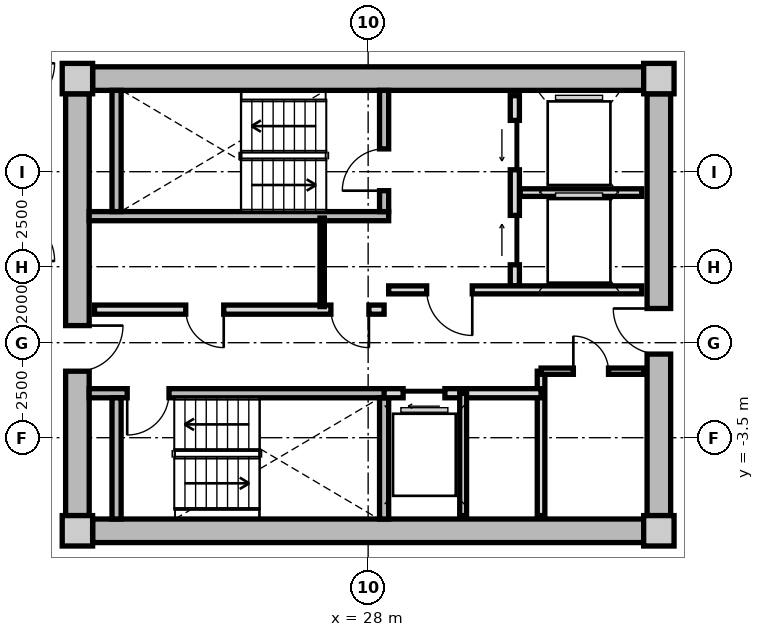
"""IFC4 building model, lengths in metres.
Left out: names, types, materials, properties, quantities, classifications, styles, units other than length and angle.
Written with IfcOpenShell. Run it as: python <this file> out.ifc"""

import sys

from ifc_helpers import new_model, si_unit, direction, frame, frame_2d, origin, origin_2d, place, context, subcontext, project, spatial, rectangle, extrude, source, transform, mapped, element, fill, save


model = new_model("IFC4")
c1 = context("Model", 3, precision=1e-05, world=origin(), true_north=direction((0.0, 1.0)))
c2 = subcontext(c1, "Body", "Model", "MODEL_VIEW")
j1 = project(units=[si_unit("LENGTHUNIT", "METRE"), si_unit("PLANEANGLEUNIT", "RADIAN")], contexts=[c1])
p1 = place(None, origin())
s1 = spatial("IfcSite", under=j1, at=p1, CompositionType="ELEMENT")
p2 = place(p1, origin())
s2 = spatial("IfcBuilding", under=s1, at=p2, CompositionType="ELEMENT")
p3 = place(p2, frame((0.0, 0.0, 140.4)))
s3 = spatial("IfcBuildingStorey", under=s2, at=p3, CompositionType="ELEMENT", Elevation=140.4)
m1 = source(origin(), c2, "Body", "SweptSolid", [
    extrude(rectangle(XDim=0.8, YDim=0.8, at=origin_2d()), origin(), (0.0, 0.0, 1.0), 3.05),
])
for number, where, z_axis, x_axis in (
    (1, (20.35, -5.95, 0.0), (0.0, 0.0, 1.0), (1.0, 0.0, 0.0)),
    (2, (35.65, -5.95, 0.0), (0.0, 0.0, 1.0), (1.0, 0.0, 0.0)),
    (3, (35.65, 5.95, 0.0), (0.0, 0.0, 1.0), (1.0, 0.0, 0.0)),
    (4, (20.35, 5.95, 0.0), (0.0, 0.0, 1.0), (1.0, 0.0, 0.0)),
):
    element("IfcColumn", number, at=place(p3, frame(where, z_axis=z_axis, x_axis=x_axis)), inside=s3, PredefinedType="COLUMN", context=c2, shape_type="MappedRepresentation", body=[
        mapped(m1, transform((0.0, 0.0, 0.0), x_axis=(1.0, 0.0, 0.0), y_axis=(0.0, 1.0, 0.0), z_axis=(0.0, 0.0, 1.0), scale=1.0)),
    ])
m2 = source(origin(), c2, "Body", "SweptSolid", [
    extrude(rectangle(XDim=14.5, YDim=0.62, at=frame_2d((7.25, 0.0))), origin(), (0.0, 0.0, 1.0), 2.81),
])
for number, where, z_axis, x_axis in (
    (5, (20.75, 5.95, 0.0), (0.0, 0.0, 1.0), (1.0, 0.0, 0.0)),
    (6, (35.25, -5.95, 0.0), (0.0, 0.0, 1.0), (-1.0, 0.0, 0.0)),
):
    element("IfcWall", number, at=place(p3, frame(where, z_axis=z_axis, x_axis=x_axis)), inside=s3, PredefinedType="SHEAR", context=c2, shape_type="MappedRepresentation", body=[
        mapped(m2, transform((0.0, 0.0, 0.0), x_axis=(1.0, 0.0, 0.0), y_axis=(0.0, 1.0, 0.0), z_axis=(0.0, 0.0, 1.0), scale=1.0)),
    ])
m3 = source(origin(), c2, "Body", "SweptSolid", [
    extrude(rectangle(XDim=11.1, YDim=0.62, at=frame_2d((5.55, 0.0))), origin(), (0.0, 0.0, 1.0), 2.81),
])
p4 = place(p3, frame((20.35, -5.55, 0.0), z_axis=(0.0, 0.0, 1.0), x_axis=(0.0, 1.0, 0.0)))
e7 = element("IfcWall", 7, at=p4, inside=s3, PredefinedType="SHEAR", context=c2, shape_type="MappedRepresentation", body=[
    mapped(m3, transform((0.0, 0.0, 0.0), x_axis=(1.0, 0.0, 0.0), y_axis=(0.0, 1.0, 0.0), z_axis=(0.0, 0.0, 1.0), scale=1.0)),
])
p5 = place(p4, frame((3.8, 0.0, 0.0)))
e8 = element("IfcOpeningElement", 8, at=p5, cuts=e7, PredefinedType="OPENING", context=c2, shape_type="SweptSolid", body=[
    extrude(rectangle(XDim=1.2, YDim=2.15, at=frame_2d((0.6, 1.075))), frame((0.0, 0.32, 0.0), z_axis=(0.0, -1.0, 0.0), x_axis=(1.0, 0.0, 0.0)), (0.0, 0.0, 1.0), 0.64),
])
p6 = place(p3, frame((35.65, 5.55, 0.0), z_axis=(0.0, 0.0, 1.0), x_axis=(0.0, -1.0, 0.0)))
e9 = element("IfcWall", 9, at=p6, inside=s3, PredefinedType="SHEAR", context=c2, shape_type="MappedRepresentation", body=[
    mapped(m3, transform((0.0, 0.0, 0.0), x_axis=(1.0, 0.0, 0.0), y_axis=(0.0, 1.0, 0.0), z_axis=(0.0, 0.0, 1.0), scale=1.0)),
])
p7 = place(p6, frame((5.65, 0.0, 0.0)))
e10 = element("IfcOpeningElement", 10, at=p7, cuts=e9, PredefinedType="OPENING", context=c2, shape_type="SweptSolid", body=[
    extrude(rectangle(XDim=1.2, YDim=2.15, at=frame_2d((0.6, 1.075))), frame((0.0, 0.32, 0.0), z_axis=(0.0, -1.0, 0.0), x_axis=(1.0, 0.0, 0.0)), (0.0, 0.0, 1.0), 0.64),
])
m4 = source(origin(), c2, "Body", "SweptSolid", [
    extrude(rectangle(XDim=7.88, YDim=0.24, at=frame_2d((3.94, 0.0))), origin(), (0.0, 0.0, 1.0), 2.81),
])
p8 = place(p3, frame((20.66, 2.33, 0.0), z_axis=(0.0, 0.0, 1.0), x_axis=(1.0, 0.0, 0.0)))
e11 = element("IfcWall", 11, at=p8, inside=s3, PredefinedType="PARTITIONING", context=c2, shape_type="MappedRepresentation", body=[
    mapped(m4, transform((0.0, 0.0, 0.0), x_axis=(1.0, 0.0, 0.0), y_axis=(0.0, 1.0, 0.0), z_axis=(0.0, 0.0, 1.0), scale=1.0)),
])
m5 = source(origin(), c2, "Body", "SweptSolid", [
    extrude(rectangle(XDim=3.19, YDim=0.24, at=frame_2d((1.595, 0.0))), origin(), (0.0, 0.0, 1.0), 2.81),
])
p9 = place(p3, frame((21.38, 2.45, 0.0), z_axis=(0.0, 0.0, 1.0), x_axis=(0.0, 1.0, 0.0)))
e12 = element("IfcWall", 12, at=p9, inside=s3, PredefinedType="PARTITIONING", context=c2, shape_type="MappedRepresentation", body=[
    mapped(m5, transform((0.0, 0.0, 0.0), x_axis=(1.0, 0.0, 0.0), y_axis=(0.0, 1.0, 0.0), z_axis=(0.0, 0.0, 1.0), scale=1.0)),
])
p10 = place(p3, frame((28.42, 2.45, 0.0), z_axis=(0.0, 0.0, 1.0), x_axis=(0.0, 1.0, 0.0)))
e13 = element("IfcWall", 13, at=p10, inside=s3, PredefinedType="PARTITIONING", context=c2, shape_type="MappedRepresentation", body=[
    mapped(m5, transform((0.0, 0.0, 0.0), x_axis=(1.0, 0.0, 0.0), y_axis=(0.0, 1.0, 0.0), z_axis=(0.0, 0.0, 1.0), scale=1.0)),
])
p11 = place(p10, frame((0.55, 0.0, 0.0)))
e14 = element("IfcOpeningElement", 14, at=p11, cuts=e13, PredefinedType="OPENING", context=c2, shape_type="SweptSolid", body=[
    extrude(rectangle(XDim=1.1, YDim=2.15, at=frame_2d((0.55, 1.075))), frame((0.0, 0.13, 0.0), z_axis=(0.0, -1.0, 0.0), x_axis=(1.0, 0.0, 0.0)), (0.0, 0.0, 1.0), 0.26),
])
p12 = place(p3, frame((20.66, -2.33, 0.0), z_axis=(0.0, 0.0, 1.0), x_axis=(1.0, 0.0, 0.0)))
e15 = element("IfcWall", 15, at=p12, inside=s3, PredefinedType="PARTITIONING", context=c2, shape_type="MappedRepresentation", body=[
    mapped(m4, transform((0.0, 0.0, 0.0), x_axis=(1.0, 0.0, 0.0), y_axis=(0.0, 1.0, 0.0), z_axis=(0.0, 0.0, 1.0), scale=1.0)),
])
p13 = place(p12, frame((1.0, 0.0, 0.0)))
e16 = element("IfcOpeningElement", 16, at=p13, cuts=e15, PredefinedType="OPENING", context=c2, shape_type="SweptSolid", body=[
    extrude(rectangle(XDim=1.1, YDim=2.15, at=frame_2d((0.55, 1.075))), frame((0.0, 0.13, 0.0), z_axis=(0.0, -1.0, 0.0), x_axis=(1.0, 0.0, 0.0)), (0.0, 0.0, 1.0), 0.26),
])
for number, where, z_axis, x_axis in (
    (17, (21.38, -5.64, 0.0), (0.0, 0.0, 1.0), (0.0, 1.0, 0.0)),
    (18, (28.42, -5.64, 0.0), (0.0, 0.0, 1.0), (0.0, 1.0, 0.0)),
):
    element("IfcWall", number, at=place(p3, frame(where, z_axis=z_axis, x_axis=x_axis)), inside=s3, PredefinedType="PARTITIONING", context=c2, shape_type="MappedRepresentation", body=[
        mapped(m5, transform((0.0, 0.0, 0.0), x_axis=(1.0, 0.0, 0.0), y_axis=(0.0, 1.0, 0.0), z_axis=(0.0, 0.0, 1.0), scale=1.0)),
    ])
m6 = source(origin(), c2, "Body", "SweptSolid", [
    extrude(rectangle(XDim=5.0, YDim=0.24, at=frame_2d((2.5, 0.0))), origin(), (0.0, 0.0, 1.0), 2.795),
])
p14 = place(p3, frame((31.86, 0.5, 0.0), z_axis=(0.0, 0.0, 1.0), x_axis=(0.0, 1.0, 0.0)))
e19 = element("IfcWall", 19, at=p14, inside=s3, PredefinedType="PARTITIONING", context=c2, shape_type="MappedRepresentation", body=[
    mapped(m6, transform((0.0, 0.0, 0.0), x_axis=(1.0, 0.0, 0.0), y_axis=(0.0, 1.0, 0.0), z_axis=(0.0, 0.0, 1.0), scale=1.0)),
])
p15 = place(p14, frame((3.05, 0.0, 0.0)))
e20 = element("IfcOpeningElement", 20, at=p15, cuts=e19, PredefinedType="OPENING", context=c2, shape_type="SweptSolid", body=[
    extrude(rectangle(XDim=1.3, YDim=2.2, at=frame_2d((0.65, 1.1))), frame((0.0, 0.13, 0.0), z_axis=(0.0, -1.0, 0.0), x_axis=(1.0, 0.0, 0.0)), (0.0, 0.0, 1.0), 0.26),
])
p16 = place(p14, frame((0.55, 0.0, 0.0)))
e21 = element("IfcOpeningElement", 21, at=p16, cuts=e19, PredefinedType="OPENING", context=c2, shape_type="SweptSolid", body=[
    extrude(rectangle(XDim=1.3, YDim=2.2, at=frame_2d((0.65, 1.1))), frame((0.0, 0.13, 0.0), z_axis=(0.0, -1.0, 0.0), x_axis=(1.0, 0.0, 0.0)), (0.0, 0.0, 1.0), 0.26),
])
m7 = source(origin(), c2, "Body", "SweptSolid", [
    extrude(rectangle(XDim=3.2, YDim=0.2, at=frame_2d((1.6, 0.0))), origin(), (0.0, 0.0, 1.0), 2.795),
])
p17 = place(p3, frame((32.0, 2.95, 0.0), z_axis=(0.0, 0.0, 1.0), x_axis=(1.0, 0.0, 0.0)))
e22 = element("IfcWall", 22, at=p17, inside=s3, PredefinedType="PARTITIONING", context=c2, shape_type="MappedRepresentation", body=[
    mapped(m7, transform((0.0, 0.0, 0.0), x_axis=(1.0, 0.0, 0.0), y_axis=(0.0, 1.0, 0.0), z_axis=(0.0, 0.0, 1.0), scale=1.0)),
])
m8 = source(origin(), c2, "Body", "SweptSolid", [
    extrude(rectangle(XDim=6.66, YDim=0.21, at=frame_2d((3.33, 0.0))), origin(), (0.0, 0.0, 1.0), 2.795),
])
p18 = place(p3, frame((28.54, 0.39, 0.0), z_axis=(0.0, 0.0, 1.0), x_axis=(1.0, 0.0, 0.0)))
e23 = element("IfcWall", 23, at=p18, inside=s3, PredefinedType="PARTITIONING", context=c2, shape_type="MappedRepresentation", body=[
    mapped(m8, transform((0.0, 0.0, 0.0), x_axis=(1.0, 0.0, 0.0), y_axis=(0.0, 1.0, 0.0), z_axis=(0.0, 0.0, 1.0), scale=1.0)),
])
p19 = place(p18, frame((1.0, 0.0, 0.0)))
e24 = element("IfcOpeningElement", 24, at=p19, cuts=e23, PredefinedType="OPENING", context=c2, shape_type="SweptSolid", body=[
    extrude(rectangle(XDim=1.2, YDim=2.15, at=frame_2d((0.6, 1.075))), frame((0.0, 0.115, 0.0), z_axis=(0.0, -1.0, 0.0), x_axis=(1.0, 0.0, 0.0)), (0.0, 0.0, 1.0), 0.23),
])
m9 = source(origin(), c2, "Body", "SweptSolid", [
    extrude(rectangle(XDim=7.62, YDim=0.24, at=frame_2d((3.81, 0.0))), origin(), (0.0, 0.0, 1.0), 2.795),
])
p20 = place(p3, frame((20.8, -0.13, 0.0), z_axis=(0.0, 0.0, 1.0), x_axis=(1.0, 0.0, 0.0)))
e25 = element("IfcWall", 25, at=p20, inside=s3, PredefinedType="PARTITIONING", context=c2, shape_type="MappedRepresentation", body=[
    mapped(m9, transform((0.0, 0.0, 0.0), x_axis=(1.0, 0.0, 0.0), y_axis=(0.0, 1.0, 0.0), z_axis=(0.0, 0.0, 1.0), scale=1.0)),
])
p21 = place(p20, frame((6.22, 0.0, 0.0)))
e26 = element("IfcOpeningElement", 26, at=p21, cuts=e25, PredefinedType="OPENING", context=c2, shape_type="SweptSolid", body=[
    extrude(rectangle(XDim=1.0, YDim=2.1, at=frame_2d((0.5, 1.05))), frame((0.0, 0.13, 0.0), z_axis=(0.0, -1.0, 0.0), x_axis=(1.0, 0.0, 0.0)), (0.0, 0.0, 1.0), 0.26),
])
p22 = place(p20, frame((2.4, 0.0, 0.0)))
e27 = element("IfcOpeningElement", 27, at=p22, cuts=e25, PredefinedType="OPENING", context=c2, shape_type="SweptSolid", body=[
    extrude(rectangle(XDim=1.0, YDim=2.1, at=frame_2d((0.5, 1.05))), frame((0.0, 0.13, 0.0), z_axis=(0.0, -1.0, 0.0), x_axis=(1.0, 0.0, 0.0)), (0.0, 0.0, 1.0), 0.26),
])
m10 = source(origin(), c2, "Body", "SweptSolid", [
    extrude(rectangle(XDim=2.33, YDim=0.115, at=frame_2d((1.165, 0.0))), origin(), (0.0, 0.0, 1.0), 2.795),
])
p23 = place(p3, frame((26.79, -0.05, 0.0), z_axis=(0.0, 0.0, 1.0), x_axis=(0.0, 1.0, 0.0)))
e28 = element("IfcWall", 28, at=p23, inside=s3, PredefinedType="PARTITIONING", context=c2, shape_type="MappedRepresentation", body=[
    mapped(m10, transform((0.0, 0.0, 0.0), x_axis=(1.0, 0.0, 0.0), y_axis=(0.0, 1.0, 0.0), z_axis=(0.0, 0.0, 1.0), scale=1.0)),
])
m11 = source(origin(), c2, "Body", "SweptSolid", [
    extrude(rectangle(XDim=3.8, YDim=0.2, at=frame_2d((1.9, 0.0))), origin(), (0.0, 0.0, 1.0), 2.795),
])
p24 = place(p3, frame((32.55, -5.55, 0.0), z_axis=(0.0, 0.0, 1.0), x_axis=(0.0, 1.0, 0.0)))
e29 = element("IfcWall", 29, at=p24, inside=s3, PredefinedType="PARTITIONING", context=c2, shape_type="MappedRepresentation", body=[
    mapped(m11, transform((0.0, 0.0, 0.0), x_axis=(1.0, 0.0, 0.0), y_axis=(0.0, 1.0, 0.0), z_axis=(0.0, 0.0, 1.0), scale=1.0)),
])
m12 = source(origin(), c2, "Body", "SweptSolid", [
    extrude(rectangle(XDim=4.13, YDim=0.24, at=frame_2d((2.065, 0.0))), origin(), (0.0, 0.0, 1.0), 2.795),
])
p25 = place(p3, frame((28.42, -2.33, 0.0), z_axis=(0.0, 0.0, 1.0), x_axis=(1.0, 0.0, 0.0)))
e30 = element("IfcWall", 30, at=p25, inside=s3, PredefinedType="PARTITIONING", context=c2, shape_type="MappedRepresentation", body=[
    mapped(m12, transform((0.0, 0.0, 0.0), x_axis=(1.0, 0.0, 0.0), y_axis=(0.0, 1.0, 0.0), z_axis=(0.0, 0.0, 1.0), scale=1.0)),
])
p26 = place(p25, frame((0.5, 0.0, 0.0)))
e31 = element("IfcOpeningElement", 31, at=p26, cuts=e30, PredefinedType="OPENING", context=c2, shape_type="SweptSolid", body=[
    extrude(rectangle(XDim=1.1, YDim=2.2, at=frame_2d((0.55, 1.1))), frame((0.0, 0.13, 0.0), z_axis=(0.0, -1.0, 0.0), x_axis=(1.0, 0.0, 0.0)), (0.0, 0.0, 1.0), 0.26),
])
m13 = source(origin(), c2, "Body", "SweptSolid", [
    extrude(rectangle(XDim=3.22, YDim=0.18, at=frame_2d((1.61, 0.0))), origin(), (0.0, 0.0, 1.0), 2.795),
])
p27 = place(p3, frame((30.5, -5.55, 0.0), z_axis=(0.0, 0.0, 1.0), x_axis=(0.0, 1.0, 0.0)))
e32 = element("IfcWall", 32, at=p27, inside=s3, PredefinedType="PARTITIONING", context=c2, shape_type="MappedRepresentation", body=[
    mapped(m13, transform((0.0, 0.0, 0.0), x_axis=(1.0, 0.0, 0.0), y_axis=(0.0, 1.0, 0.0), z_axis=(0.0, 0.0, 1.0), scale=1.0)),
])
m14 = source(origin(), c2, "Body", "SweptSolid", [
    extrude(rectangle(XDim=2.7, YDim=0.165, at=frame_2d((1.35, 0.0))), origin(), (0.0, 0.0, 1.0), 2.795),
])
p28 = place(p3, frame((32.55, -1.75, 0.0), z_axis=(0.0, 0.0, 1.0), x_axis=(1.0, 0.0, 0.0)))
e33 = element("IfcWall", 33, at=p28, inside=s3, PredefinedType="PARTITIONING", context=c2, shape_type="MappedRepresentation", body=[
    mapped(m14, transform((0.0, 0.0, 0.0), x_axis=(1.0, 0.0, 0.0), y_axis=(0.0, 1.0, 0.0), z_axis=(0.0, 0.0, 1.0), scale=1.0)),
])
p29 = place(p28, frame((0.85, 0.0, 0.0)))
e34 = element("IfcOpeningElement", 34, at=p29, cuts=e33, PredefinedType="OPENING", context=c2, shape_type="SweptSolid", body=[
    extrude(rectangle(XDim=0.925, YDim=2.1, at=frame_2d((0.462, 1.05))), frame((0.0, 0.093, 0.0), z_axis=(0.0, -1.0, 0.0), x_axis=(1.0, 0.0, 0.0)), (0.0, 0.0, 1.0), 0.185),
])
m15 = source(origin(), c2, "Body", "SweptSolid", [
    extrude(rectangle(XDim=1.1, YDim=2.15, at=frame_2d((0.55, 1.075))), frame((0.0, 0.025, 0.0), z_axis=(0.0, -1.0, 0.0), x_axis=(1.0, 0.0, 0.0)), (0.0, 0.0, 1.0), 0.05),
])
p30 = place(p11, origin())
e35 = element("IfcDoor", 35, at=p30, inside=s3, OperationType="SINGLE_SWING_LEFT", PredefinedType="DOOR", context=c2, shape_type="MappedRepresentation", body=[
    mapped(m15, transform((0.0, 0.0, 0.0), x_axis=(1.0, 0.0, 0.0), y_axis=(0.0, 1.0, 0.0), z_axis=(0.0, 0.0, 1.0), scale=1.0)),
])
fill(e14, e35)
p31 = place(p13, frame((1.1, 0.0, 0.0), z_axis=(0.0, 0.0, 1.0), x_axis=(-1.0, 0.0, 0.0)))
e36 = element("IfcDoor", 36, at=p31, inside=s3, OperationType="SINGLE_SWING_RIGHT", PredefinedType="DOOR", context=c2, shape_type="MappedRepresentation", body=[
    mapped(m15, transform((0.0, 0.0, 0.0), x_axis=(1.0, 0.0, 0.0), y_axis=(0.0, 1.0, 0.0), z_axis=(0.0, 0.0, 1.0), scale=1.0)),
])
fill(e16, e36)
m16 = source(origin(), c2, "Body", "SweptSolid", [
    extrude(rectangle(XDim=1.3, YDim=2.2, at=frame_2d((0.65, 1.1))), frame((0.0, 0.025, 0.0), z_axis=(0.0, -1.0, 0.0), x_axis=(1.0, 0.0, 0.0)), (0.0, 0.0, 1.0), 0.05),
])
p32 = place(p15, origin())
e37 = element("IfcDoor", 37, at=p32, inside=s3, OperationType="SLIDING_TO_LEFT", PredefinedType="DOOR", context=c2, shape_type="MappedRepresentation", body=[
    mapped(m16, transform((0.0, 0.0, 0.0), x_axis=(1.0, 0.0, 0.0), y_axis=(0.0, 1.0, 0.0), z_axis=(0.0, 0.0, 1.0), scale=1.0)),
])
fill(e20, e37)
p33 = place(p16, origin())
e38 = element("IfcDoor", 38, at=p33, inside=s3, OperationType="SLIDING_TO_RIGHT", PredefinedType="DOOR", context=c2, shape_type="MappedRepresentation", body=[
    mapped(m16, transform((0.0, 0.0, 0.0), x_axis=(1.0, 0.0, 0.0), y_axis=(0.0, 1.0, 0.0), z_axis=(0.0, 0.0, 1.0), scale=1.0)),
])
fill(e21, e38)
m17 = source(origin(), c2, "Body", "SweptSolid", [
    extrude(rectangle(XDim=1.2, YDim=2.15, at=frame_2d((0.6, 1.075))), frame((0.0, 0.025, 0.0), z_axis=(0.0, -1.0, 0.0), x_axis=(1.0, 0.0, 0.0)), (0.0, 0.0, 1.0), 0.05),
])
p34 = place(p19, frame((1.2, 0.0, 0.0), z_axis=(0.0, 0.0, 1.0), x_axis=(-1.0, 0.0, 0.0)))
e39 = element("IfcDoor", 39, at=p34, inside=s3, OperationType="SINGLE_SWING_LEFT", PredefinedType="DOOR", context=c2, shape_type="MappedRepresentation", body=[
    mapped(m17, transform((0.0, 0.0, 0.0), x_axis=(1.0, 0.0, 0.0), y_axis=(0.0, 1.0, 0.0), z_axis=(0.0, 0.0, 1.0), scale=1.0)),
])
fill(e24, e39)
p35 = place(p5, frame((1.2, 0.0, 0.0), z_axis=(0.0, 0.0, 1.0), x_axis=(-1.0, 0.0, 0.0)))
e40 = element("IfcDoor", 40, at=p35, inside=s3, OperationType="SINGLE_SWING_LEFT", PredefinedType="DOOR", context=c2, shape_type="MappedRepresentation", body=[
    mapped(m17, transform((0.0, 0.0, 0.0), x_axis=(1.0, 0.0, 0.0), y_axis=(0.0, 1.0, 0.0), z_axis=(0.0, 0.0, 1.0), scale=1.0)),
])
fill(e8, e40)
p36 = place(p7, frame((1.2, 0.0, 0.0), z_axis=(0.0, 0.0, 1.0), x_axis=(-1.0, 0.0, 0.0)))
e41 = element("IfcDoor", 41, at=p36, inside=s3, OperationType="SINGLE_SWING_RIGHT", PredefinedType="DOOR", context=c2, shape_type="MappedRepresentation", body=[
    mapped(m17, transform((0.0, 0.0, 0.0), x_axis=(1.0, 0.0, 0.0), y_axis=(0.0, 1.0, 0.0), z_axis=(0.0, 0.0, 1.0), scale=1.0)),
])
fill(e10, e41)
m18 = source(origin(), c2, "Body", "SweptSolid", [
    extrude(rectangle(XDim=1.0, YDim=2.1, at=frame_2d((0.5, 1.05))), frame((0.0, 0.025, 0.0), z_axis=(0.0, -1.0, 0.0), x_axis=(1.0, 0.0, 0.0)), (0.0, 0.0, 1.0), 0.05),
])
p37 = place(p21, frame((1.0, 0.0, 0.0), z_axis=(0.0, 0.0, 1.0), x_axis=(-1.0, 0.0, 0.0)))
e42 = element("IfcDoor", 42, at=p37, inside=s3, OperationType="SINGLE_SWING_LEFT", PredefinedType="DOOR", context=c2, shape_type="MappedRepresentation", body=[
    mapped(m18, transform((0.0, 0.0, 0.0), x_axis=(1.0, 0.0, 0.0), y_axis=(0.0, 1.0, 0.0), z_axis=(0.0, 0.0, 1.0), scale=1.0)),
])
fill(e26, e42)
p38 = place(p22, frame((1.0, 0.0, 0.0), z_axis=(0.0, 0.0, 1.0), x_axis=(-1.0, 0.0, 0.0)))
e43 = element("IfcDoor", 43, at=p38, inside=s3, OperationType="SINGLE_SWING_LEFT", PredefinedType="DOOR", context=c2, shape_type="MappedRepresentation", body=[
    mapped(m18, transform((0.0, 0.0, 0.0), x_axis=(1.0, 0.0, 0.0), y_axis=(0.0, 1.0, 0.0), z_axis=(0.0, 0.0, 1.0), scale=1.0)),
])
fill(e27, e43)
m19 = source(origin(), c2, "Body", "SweptSolid", [
    extrude(rectangle(XDim=1.1, YDim=2.2, at=frame_2d((0.55, 1.1))), frame((0.0, 0.025, 0.0), z_axis=(0.0, -1.0, 0.0), x_axis=(1.0, 0.0, 0.0)), (0.0, 0.0, 1.0), 0.05),
])
p39 = place(p26, frame((1.1, 0.0, 0.0), z_axis=(0.0, 0.0, 1.0), x_axis=(-1.0, 0.0, 0.0)))
e44 = element("IfcDoor", 44, at=p39, inside=s3, OperationType="SLIDING_TO_LEFT", PredefinedType="DOOR", context=c2, shape_type="MappedRepresentation", body=[
    mapped(m19, transform((0.0, 0.0, 0.0), x_axis=(1.0, 0.0, 0.0), y_axis=(0.0, 1.0, 0.0), z_axis=(0.0, 0.0, 1.0), scale=1.0)),
])
fill(e31, e44)
m20 = source(origin(), c2, "Body", "SweptSolid", [
    extrude(rectangle(XDim=0.925, YDim=2.1, at=frame_2d((0.462, 1.05))), frame((0.0, 0.025, 0.0), z_axis=(0.0, -1.0, 0.0), x_axis=(1.0, 0.0, 0.0)), (0.0, 0.0, 1.0), 0.05),
])
p40 = place(p29, origin())
e45 = element("IfcDoor", 45, at=p40, inside=s3, OperationType="SINGLE_SWING_LEFT", PredefinedType="DOOR", context=c2, shape_type="MappedRepresentation", body=[
    mapped(m20, transform((0.0, 0.0, 0.0), x_axis=(1.0, 0.0, 0.0), y_axis=(0.0, 1.0, 0.0), z_axis=(0.0, 0.0, 1.0), scale=1.0)),
])
fill(e34, e45)
save(model, sys.argv[1])
